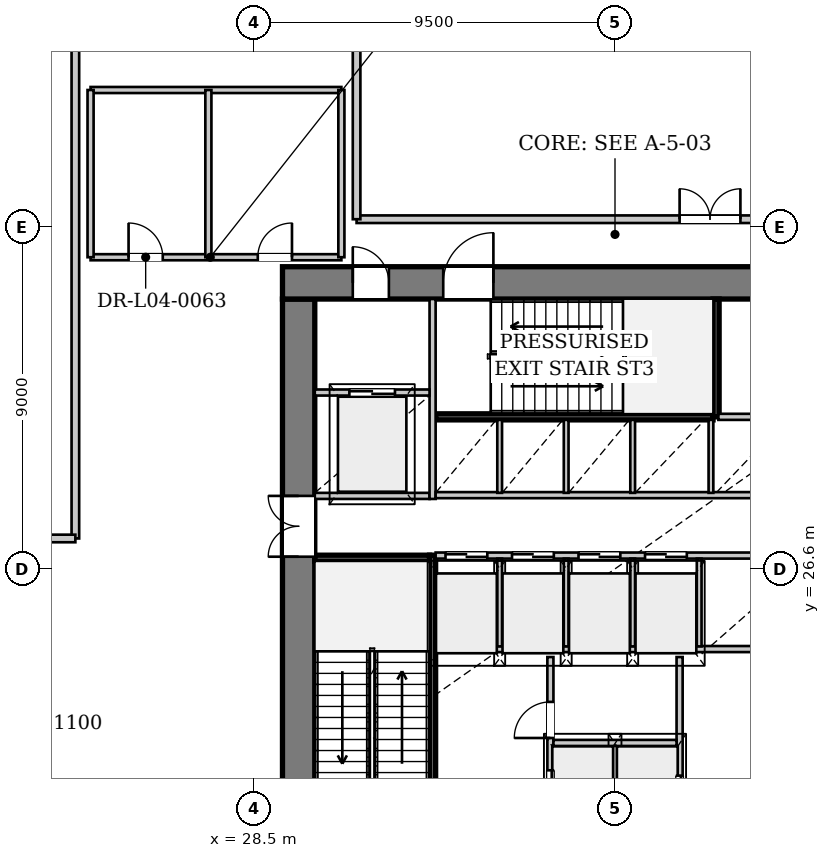
"""IFC4 building model, lengths in metres.
Left out: names, types, materials, properties, quantities, classifications, styles, units other than length and angle.
Written with IfcOpenShell. Run it as: python <this file> out.ifc"""

import sys

from ifc_helpers import new_model, si_unit, direction, frame, frame_2d, origin, place, context, subcontext, project, spatial, rectangle, extrude, source, transform, mapped, element, fill, save


model = new_model("IFC4")
c1 = context("Model", 3, precision=1e-05, world=origin(), true_north=direction((0.0, 1.0)))
c2 = subcontext(c1, "Body", "Model", "MODEL_VIEW")
j1 = project(units=[si_unit("LENGTHUNIT", "METRE"), si_unit("PLANEANGLEUNIT", "RADIAN")], contexts=[c1])
p1 = place(None, origin())
s1 = spatial("IfcSite", under=j1, at=p1, CompositionType="ELEMENT")
p2 = place(p1, origin())
s2 = spatial("IfcBuilding", under=s1, at=p2, CompositionType="ELEMENT")
p3 = place(p2, frame((0.0, 0.0, 20.1)))
s3 = spatial("IfcBuildingStorey", under=s2, at=p3, CompositionType="ELEMENT", Elevation=20.1)
p4 = place(p3, frame((29.675, 19.5, 0.0), z_axis=(0.0, 0.0, 1.0), x_axis=(0.0, 1.0, 0.0)))
e1 = element("IfcWall", 1, at=p4, inside=s3, PredefinedType="SHEAR", context=c2, shape_type="SweptSolid", body=[
    extrude(rectangle(XDim=14.2, YDim=0.85, at=frame_2d((7.1, 0.0))), origin(), (0.0, 0.0, 1.0), 4.08),
])
p5 = place(p4, frame((7.42, 0.0, 0.0)))
e2 = element("IfcOpeningElement", 2, at=p5, cuts=e1, PredefinedType="OPENING", context=c2, shape_type="SweptSolid", body=[
    extrude(rectangle(XDim=1.6, YDim=2.2, at=frame_2d((0.8, 1.1))), frame((0.0, 0.435, 0.0), z_axis=(0.0, -1.0, 0.0), x_axis=(1.0, 0.0, 0.0)), (0.0, 0.0, 1.0), 0.87),
])
p6 = place(p3, frame((29.25, 34.125, 0.0), z_axis=(0.0, 0.0, 1.0), x_axis=(1.0, 0.0, 0.0)))
e3 = element("IfcWall", 3, at=p6, inside=s3, PredefinedType="SHEAR", context=c2, shape_type="SweptSolid", body=[
    extrude(rectangle(XDim=17.5, YDim=0.85, at=frame_2d((8.75, 0.0))), origin(), (0.0, 0.0, 1.0), 4.08),
])
p7 = place(p6, frame((1.85, 0.0, 0.0)))
e4 = element("IfcOpeningElement", 4, at=p7, cuts=e3, PredefinedType="OPENING", context=c2, shape_type="SweptSolid", body=[
    extrude(rectangle(XDim=0.95, YDim=2.1, at=frame_2d((0.475, 1.05))), frame((0.0, 0.435, 0.0), z_axis=(0.0, -1.0, 0.0), x_axis=(1.0, 0.0, 0.0)), (0.0, 0.0, 1.0), 0.87),
])
p8 = place(p6, frame((4.23, 0.0, 0.0)))
e5 = element("IfcOpeningElement", 5, at=p8, cuts=e3, PredefinedType="OPENING", context=c2, shape_type="SweptSolid", body=[
    extrude(rectangle(XDim=1.32, YDim=2.2, at=frame_2d((0.66, 1.1))), frame((0.0, 0.435, 0.0), z_axis=(0.0, -1.0, 0.0), x_axis=(1.0, 0.0, 0.0)), (0.0, 0.0, 1.0), 0.87),
])
p9 = place(p6, frame((15.3, 0.0, 0.0)))
e6 = element("IfcOpeningElement", 6, at=p9, cuts=e3, PredefinedType="OPENING", context=c2, shape_type="SweptSolid", body=[
    extrude(rectangle(XDim=0.95, YDim=2.1, at=frame_2d((0.475, 1.05))), frame((0.0, 0.435, 0.0), z_axis=(0.0, -1.0, 0.0), x_axis=(1.0, 0.0, 0.0)), (0.0, 0.0, 1.0), 0.87),
])
p10 = place(p3, frame((33.2, 19.5, 0.0), z_axis=(0.0, 0.0, 1.0), x_axis=(0.0, 1.0, 0.0)))
e7 = element("IfcWall", 7, at=p10, inside=s3, PredefinedType="PARTITIONING", context=c2, shape_type="SweptSolid", body=[
    extrude(rectangle(XDim=7.46, YDim=0.16, at=frame_2d((3.73, 0.0))), origin(), (0.0, 0.0, 1.0), 4.08),
])
p11 = place(p10, frame((0.08, 0.0, 0.0)))
e8 = element("IfcOpeningElement", 8, at=p11, cuts=e7, PredefinedType="OPENING", context=c2, shape_type="SweptSolid", body=[
    extrude(rectangle(XDim=1.32, YDim=2.2, at=frame_2d((0.66, 1.1))), frame((0.0, 0.09, 0.0), z_axis=(0.0, -1.0, 0.0), x_axis=(1.0, 0.0, 0.0)), (0.0, 0.0, 1.0), 0.18),
])
p12 = place(p3, frame((30.1, 26.88, 0.0), z_axis=(0.0, 0.0, 1.0), x_axis=(1.0, 0.0, 0.0)))
e9 = element("IfcWall", 9, at=p12, inside=s3, PredefinedType="PARTITIONING", context=c2, shape_type="SweptSolid", body=[
    extrude(rectangle(XDim=3.02, YDim=0.16, at=frame_2d((1.51, 0.0))), origin(), (0.0, 0.0, 1.0), 4.08),
])
p13 = place(p3, frame((33.28, 30.6, 0.0), z_axis=(0.0, 0.0, 1.0), x_axis=(1.0, 0.0, 0.0)))
e10 = element("IfcWall", 10, at=p13, inside=s3, PredefinedType="PARTITIONING", context=c2, shape_type="SweptSolid", body=[
    extrude(rectangle(XDim=7.3, YDim=0.16, at=frame_2d((3.65, 0.0))), origin(), (0.0, 0.0, 1.0), 4.08),
])
p14 = place(p3, frame((40.66, 30.6, 0.0), z_axis=(0.0, 0.0, 1.0), x_axis=(0.0, 1.0, 0.0)))
e11 = element("IfcWall", 11, at=p14, inside=s3, PredefinedType="PARTITIONING", context=c2, shape_type="SweptSolid", body=[
    extrude(rectangle(XDim=3.1, YDim=0.16, at=frame_2d((1.55, 0.0))), origin(), (0.0, 0.0, 1.0), 4.08),
])
p15 = place(p3, frame((36.3, 19.5, 0.0), z_axis=(0.0, 0.0, 1.0), x_axis=(0.0, 1.0, 0.0)))
e12 = element("IfcWall", 12, at=p15, inside=s3, PredefinedType="PARTITIONING", context=c2, shape_type="SweptSolid", body=[
    extrude(rectangle(XDim=4.78, YDim=0.16, at=frame_2d((2.39, 0.0))), origin(), (0.0, 0.0, 1.0), 4.08),
])
p16 = place(p15, frame((0.6, 0.0, 0.0)))
e13 = element("IfcOpeningElement", 13, at=p16, cuts=e12, PredefinedType="OPENING", context=c2, shape_type="SweptSolid", body=[
    extrude(rectangle(XDim=1.2, YDim=2.2, at=frame_2d((0.6, 1.1))), frame((0.0, 0.09, 0.0), z_axis=(0.0, -1.0, 0.0), x_axis=(1.0, 0.0, 0.0)), (0.0, 0.0, 1.0), 0.18),
])
p17 = place(p15, frame((2.65, 0.0, 0.0)))
e14 = element("IfcOpeningElement", 14, at=p17, cuts=e12, PredefinedType="OPENING", context=c2, shape_type="SweptSolid", body=[
    extrude(rectangle(XDim=0.95, YDim=2.1, at=frame_2d((0.475, 1.05))), frame((0.0, 0.09, 0.0), z_axis=(0.0, -1.0, 0.0), x_axis=(1.0, 0.0, 0.0)), (0.0, 0.0, 1.0), 0.18),
])
p18 = place(p3, frame((39.7, 24.28, 0.0), z_axis=(0.0, 0.0, 1.0), x_axis=(0.0, -1.0, 0.0)))
e15 = element("IfcWall", 15, at=p18, inside=s3, PredefinedType="PARTITIONING", context=c2, shape_type="SweptSolid", body=[
    extrude(rectangle(XDim=4.78, YDim=0.16, at=frame_2d((2.39, 0.0))), origin(), (0.0, 0.0, 1.0), 4.08),
])
p19 = place(p18, frame((3.12, 0.0, 0.0)))
e16 = element("IfcOpeningElement", 16, at=p19, cuts=e15, PredefinedType="OPENING", context=c2, shape_type="SweptSolid", body=[
    extrude(rectangle(XDim=1.2, YDim=2.2, at=frame_2d((0.6, 1.1))), frame((0.0, 0.09, 0.0), z_axis=(0.0, -1.0, 0.0), x_axis=(1.0, 0.0, 0.0)), (0.0, 0.0, 1.0), 0.18),
])
p20 = place(p3, frame((38.0, 19.5, 0.0), z_axis=(0.0, 0.0, 1.0), x_axis=(0.0, 1.0, 0.0)))
e17 = element("IfcWall", 17, at=p20, inside=s3, PredefinedType="PARTITIONING", context=c2, shape_type="SweptSolid", body=[
    extrude(rectangle(XDim=2.46, YDim=0.125, at=frame_2d((1.23, 0.0))), origin(), (0.0, 0.0, 1.0), 4.08),
])
p21 = place(p3, frame((36.38, 22.02, 0.0), z_axis=(0.0, 0.0, 1.0), x_axis=(1.0, 0.0, 0.0)))
e18 = element("IfcWall", 18, at=p21, inside=s3, PredefinedType="PARTITIONING", context=c2, shape_type="SweptSolid", body=[
    extrude(rectangle(XDim=3.24, YDim=0.16, at=frame_2d((1.62, 0.0))), origin(), (0.0, 0.0, 1.0), 4.08),
])
p22 = place(p3, frame((33.28, 24.49, 0.0), z_axis=(0.0, 0.0, 1.0), x_axis=(1.0, 0.0, 0.0)))
e19 = element("IfcWall", 19, at=p22, inside=s3, PredefinedType="PARTITIONING", context=c2, shape_type="SweptSolid", body=[
    extrude(rectangle(XDim=9.44, YDim=0.16, at=frame_2d((4.72, 0.0))), origin(), (0.0, 0.0, 1.0), 4.08),
])
p23 = place(p3, frame((30.1, 28.52, 0.0), z_axis=(0.0, 0.0, 1.0), x_axis=(1.0, 0.0, 0.0)))
e20 = element("IfcWall", 20, at=p23, inside=s3, PredefinedType="PARTITIONING", context=c2, shape_type="SweptSolid", body=[
    extrude(rectangle(XDim=3.02, YDim=0.16, at=frame_2d((1.51, 0.0))), origin(), (0.0, 0.0, 1.0), 4.08),
])
p24 = place(p3, frame((33.2, 28.44, 0.0), z_axis=(0.0, 0.0, 1.0), x_axis=(0.0, 1.0, 0.0)))
e21 = element("IfcWall", 21, at=p24, inside=s3, PredefinedType="PARTITIONING", context=c2, shape_type="SweptSolid", body=[
    extrude(rectangle(XDim=5.26, YDim=0.16, at=frame_2d((2.63, 0.0))), origin(), (0.0, 0.0, 1.0), 4.08),
])
p25 = place(p3, frame((30.1, 31.24, 0.0), z_axis=(0.0, 0.0, 1.0), x_axis=(1.0, 0.0, 0.0)))
e22 = element("IfcWall", 22, at=p25, inside=s3, PredefinedType="PARTITIONING", context=c2, shape_type="SweptSolid", body=[
    extrude(rectangle(XDim=3.02, YDim=0.16, at=frame_2d((1.51, 0.0))), origin(), (0.0, 0.0, 1.0), 4.08),
])
p26 = place(p25, frame((0.91, 0.0, 0.0)))
e23 = element("IfcOpeningElement", 23, at=p26, cuts=e22, PredefinedType="OPENING", context=c2, shape_type="SweptSolid", body=[
    extrude(rectangle(XDim=1.2, YDim=2.2, at=frame_2d((0.6, 1.1))), frame((0.0, 0.09, 0.0), z_axis=(0.0, -1.0, 0.0), x_axis=(1.0, 0.0, 0.0)), (0.0, 0.0, 1.0), 0.18),
])
p27 = place(p3, frame((33.28, 26.95, 0.0), z_axis=(0.0, 0.0, 1.0), x_axis=(1.0, 0.0, 0.0)))
e24 = element("IfcWall", 24, at=p27, inside=s3, PredefinedType="PARTITIONING", context=c2, shape_type="SweptSolid", body=[
    extrude(rectangle(XDim=9.44, YDim=0.16, at=frame_2d((4.72, 0.0))), origin(), (0.0, 0.0, 1.0), 4.08),
])
p28 = place(p27, frame((0.26, 0.0, 0.0)))
e25 = element("IfcOpeningElement", 25, at=p28, cuts=e24, PredefinedType="OPENING", context=c2, shape_type="SweptSolid", body=[
    extrude(rectangle(XDim=1.1, YDim=2.2, at=frame_2d((0.55, 1.1))), frame((0.0, 0.09, 0.0), z_axis=(0.0, -1.0, 0.0), x_axis=(1.0, 0.0, 0.0)), (0.0, 0.0, 1.0), 0.18),
])
p29 = place(p27, frame((2.01, 0.0, 0.0)))
e26 = element("IfcOpeningElement", 26, at=p29, cuts=e24, PredefinedType="OPENING", context=c2, shape_type="SweptSolid", body=[
    extrude(rectangle(XDim=1.1, YDim=2.2, at=frame_2d((0.55, 1.1))), frame((0.0, 0.09, 0.0), z_axis=(0.0, -1.0, 0.0), x_axis=(1.0, 0.0, 0.0)), (0.0, 0.0, 1.0), 0.18),
])
p30 = place(p27, frame((3.76, 0.0, 0.0)))
e27 = element("IfcOpeningElement", 27, at=p30, cuts=e24, PredefinedType="OPENING", context=c2, shape_type="SweptSolid", body=[
    extrude(rectangle(XDim=1.1, YDim=2.2, at=frame_2d((0.55, 1.1))), frame((0.0, 0.09, 0.0), z_axis=(0.0, -1.0, 0.0), x_axis=(1.0, 0.0, 0.0)), (0.0, 0.0, 1.0), 0.18),
])
p31 = place(p27, frame((5.51, 0.0, 0.0)))
e28 = element("IfcOpeningElement", 28, at=p31, cuts=e24, PredefinedType="OPENING", context=c2, shape_type="SweptSolid", body=[
    extrude(rectangle(XDim=1.1, YDim=2.2, at=frame_2d((0.55, 1.1))), frame((0.0, 0.09, 0.0), z_axis=(0.0, -1.0, 0.0), x_axis=(1.0, 0.0, 0.0)), (0.0, 0.0, 1.0), 0.18),
])
for number, where, z_axis, x_axis in (
    (29, (34.965, 24.56, 0.0), (0.0, 0.0, 1.0), (0.0, 1.0, 0.0)),
    (30, (36.715, 24.56, 0.0), (0.0, 0.0, 1.0), (0.0, 1.0, 0.0)),
    (31, (38.465, 24.56, 0.0), (0.0, 0.0, 1.0), (0.0, 1.0, 0.0)),
    (32, (40.215, 24.56, 0.0), (0.0, 0.0, 1.0), (0.0, 1.0, 0.0)),
):
    element("IfcWall", number, at=place(p3, frame(where, z_axis=z_axis, x_axis=x_axis)), inside=s3, PredefinedType="PARTITIONING", context=c2, shape_type="SweptSolid", body=[
        extrude(rectangle(XDim=2.31, YDim=0.125, at=frame_2d((1.155, 0.0))), origin(), (0.0, 0.0, 1.0), 4.08),
    ])
p32 = place(p3, frame((33.28, 28.54, 0.0), z_axis=(0.0, 0.0, 1.0), x_axis=(1.0, 0.0, 0.0)))
e33 = element("IfcWall", 33, at=p32, inside=s3, PredefinedType="PARTITIONING", context=c2, shape_type="SweptSolid", body=[
    extrude(rectangle(XDim=12.62, YDim=0.16, at=frame_2d((6.31, 0.0))), origin(), (0.0, 0.0, 1.0), 4.08),
])
p33 = place(p3, frame((40.72, 30.6, 0.0), z_axis=(0.0, 0.0, 1.0), x_axis=(1.0, 0.0, 0.0)))
e34 = element("IfcWall", 34, at=p33, inside=s3, PredefinedType="PARTITIONING", context=c2, shape_type="SweptSolid", body=[
    extrude(rectangle(XDim=5.18, YDim=0.16, at=frame_2d((2.59, 0.0))), origin(), (0.0, 0.0, 1.0), 4.08),
])
for number, where, z_axis, x_axis in (
    (35, (34.965, 28.6, 0.0), (0.0, 0.0, 1.0), (0.0, 1.0, 0.0)),
    (36, (36.715, 28.6, 0.0), (0.0, 0.0, 1.0), (0.0, 1.0, 0.0)),
    (37, (38.465, 28.6, 0.0), (0.0, 0.0, 1.0), (0.0, 1.0, 0.0)),
    (38, (40.525, 28.6, 0.0), (0.0, 0.0, 1.0), (0.0, 1.0, 0.0)),
):
    element("IfcWall", number, at=place(p3, frame(where, z_axis=z_axis, x_axis=x_axis)), inside=s3, PredefinedType="PARTITIONING", context=c2, shape_type="SweptSolid", body=[
        extrude(rectangle(XDim=1.92, YDim=0.125, at=frame_2d((0.96, 0.0))), origin(), (0.0, 0.0, 1.0), 4.08),
    ])
p34 = place(p3, frame((23.8, 27.4, 0.0), z_axis=(0.0, 0.0, 1.0), x_axis=(0.0, 1.0, 0.0)))
e39 = element("IfcWall", 39, at=p34, inside=s3, PredefinedType="PARTITIONING", context=c2, shape_type="SweptSolid", body=[
    extrude(rectangle(XDim=21.14, YDim=0.2, at=frame_2d((10.57, 0.0))), origin(), (0.0, 0.0, 1.0), 3.43),
])
p35 = place(p34, frame((13.6, 0.0, 0.0)))
e40 = element("IfcOpeningElement", 40, at=p35, cuts=e39, PredefinedType="OPENING", context=c2, shape_type="SweptSolid", body=[
    extrude(rectangle(XDim=1.5, YDim=2.25, at=frame_2d((0.75, 1.125))), frame((0.0, 0.11, 0.0), z_axis=(0.0, -1.0, 0.0), x_axis=(1.0, 0.0, 0.0)), (0.0, 0.0, 1.0), 0.22),
])
p36 = place(p3, frame((6.58, 27.4, 0.0), z_axis=(0.0, 0.0, 1.0), x_axis=(1.0, 0.0, 0.0)))
e41 = element("IfcWall", 41, at=p36, inside=s3, PredefinedType="PARTITIONING", context=c2, shape_type="SweptSolid", body=[
    extrude(rectangle(XDim=17.22, YDim=0.2, at=frame_2d((8.61, 0.0))), origin(), (0.0, 0.0, 1.0), 3.43),
])
p37 = place(p3, frame((24.2, 34.8, 0.0), z_axis=(0.0, 0.0, 1.0), x_axis=(1.0, 0.0, 0.0)))
e42 = element("IfcWall", 42, at=p37, inside=s3, PredefinedType="PARTITIONING", context=c2, shape_type="SweptSolid", body=[
    extrude(rectangle(XDim=6.6, YDim=0.16, at=frame_2d((3.3, 0.0))), origin(), (0.0, 0.0, 1.0), 3.43),
])
p38 = place(p37, frame((1.0, 0.0, 0.0)))
e43 = element("IfcOpeningElement", 43, at=p38, cuts=e42, PredefinedType="OPENING", context=c2, shape_type="SweptSolid", body=[
    extrude(rectangle(XDim=0.9, YDim=2.1, at=frame_2d((0.45, 1.05))), frame((0.0, 0.09, 0.0), z_axis=(0.0, -1.0, 0.0), x_axis=(1.0, 0.0, 0.0)), (0.0, 0.0, 1.0), 0.18),
])
p39 = place(p37, frame((4.4, 0.0, 0.0)))
e44 = element("IfcOpeningElement", 44, at=p39, cuts=e42, PredefinedType="OPENING", context=c2, shape_type="SweptSolid", body=[
    extrude(rectangle(XDim=0.9, YDim=2.1, at=frame_2d((0.45, 1.05))), frame((0.0, 0.09, 0.0), z_axis=(0.0, -1.0, 0.0), x_axis=(1.0, 0.0, 0.0)), (0.0, 0.0, 1.0), 0.18),
])
p40 = place(p3, frame((24.2, 39.2, 0.0), z_axis=(0.0, 0.0, 1.0), x_axis=(1.0, 0.0, 0.0)))
e45 = element("IfcWall", 45, at=p40, inside=s3, PredefinedType="PARTITIONING", context=c2, shape_type="SweptSolid", body=[
    extrude(rectangle(XDim=6.6, YDim=0.16, at=frame_2d((3.3, 0.0))), origin(), (0.0, 0.0, 1.0), 3.43),
])
for number, where, z_axis, x_axis in (
    (46, (24.2, 34.8, 0.0), (0.0, 0.0, 1.0), (0.0, 1.0, 0.0)),
    (47, (27.3, 34.8, 0.0), (0.0, 0.0, 1.0), (0.0, 1.0, 0.0)),
    (48, (30.8, 34.8, 0.0), (0.0, 0.0, 1.0), (0.0, 1.0, 0.0)),
):
    element("IfcWall", number, at=place(p3, frame(where, z_axis=z_axis, x_axis=x_axis)), inside=s3, PredefinedType="PARTITIONING", context=c2, shape_type="SweptSolid", body=[
        extrude(rectangle(XDim=4.4, YDim=0.16, at=frame_2d((2.2, 0.0))), origin(), (0.0, 0.0, 1.0), 3.43),
    ])
p41 = place(p3, frame((31.2, 35.8, 0.0), z_axis=(0.0, 0.0, 1.0), x_axis=(1.0, 0.0, 0.0)))
e49 = element("IfcWall", 49, at=p41, inside=s3, PredefinedType="PARTITIONING", context=c2, shape_type="SweptSolid", body=[
    extrude(rectangle(XDim=20.88, YDim=0.2, at=frame_2d((10.44, 0.0))), origin(), (0.0, 0.0, 1.0), 3.43),
])
p42 = place(p41, frame((8.5, 0.0, 0.0)))
e50 = element("IfcOpeningElement", 50, at=p42, cuts=e49, PredefinedType="OPENING", context=c2, shape_type="SweptSolid", body=[
    extrude(rectangle(XDim=1.6, YDim=2.2, at=frame_2d((0.8, 1.1))), frame((0.0, 0.11, 0.0), z_axis=(0.0, -1.0, 0.0), x_axis=(1.0, 0.0, 0.0)), (0.0, 0.0, 1.0), 0.22),
])
p43 = place(p3, frame((31.2, 35.8, 0.0), z_axis=(0.0, 0.0, 1.0), x_axis=(0.0, 1.0, 0.0)))
e51 = element("IfcWall", 51, at=p43, inside=s3, PredefinedType="PARTITIONING", context=c2, shape_type="SweptSolid", body=[
    extrude(rectangle(XDim=12.74, YDim=0.2, at=frame_2d((6.37, 0.0))), origin(), (0.0, 0.0, 1.0), 3.43),
])
m1 = source(origin(), c2, "Body", "SweptSolid", [
    extrude(rectangle(XDim=1.6, YDim=2.2, at=frame_2d((0.8, 1.1))), frame((0.0, 0.025, 0.0), z_axis=(0.0, -1.0, 0.0), x_axis=(1.0, 0.0, 0.0)), (0.0, 0.0, 1.0), 0.05),
])
p44 = place(p5, origin())
e52 = element("IfcDoor", 52, at=p44, inside=s3, OperationType="DOUBLE_DOOR_SINGLE_SWING", PredefinedType="DOOR", context=c2, shape_type="MappedRepresentation", body=[
    mapped(m1, transform((0.0, 0.0, 0.0), x_axis=(1.0, 0.0, 0.0), y_axis=(0.0, 1.0, 0.0), z_axis=(0.0, 0.0, 1.0), scale=1.0)),
])
fill(e2, e52)
m2 = source(origin(), c2, "Body", "SweptSolid", [
    extrude(rectangle(XDim=0.95, YDim=2.1, at=frame_2d((0.475, 1.05))), frame((0.0, 0.025, 0.0), z_axis=(0.0, -1.0, 0.0), x_axis=(1.0, 0.0, 0.0)), (0.0, 0.0, 1.0), 0.05),
])
p45 = place(p7, origin())
e53 = element("IfcDoor", 53, at=p45, inside=s3, OperationType="SINGLE_SWING_LEFT", PredefinedType="DOOR", context=c2, shape_type="MappedRepresentation", body=[
    mapped(m2, transform((0.0, 0.0, 0.0), x_axis=(1.0, 0.0, 0.0), y_axis=(0.0, 1.0, 0.0), z_axis=(0.0, 0.0, 1.0), scale=1.0)),
])
fill(e4, e53)
m3 = source(origin(), c2, "Body", "SweptSolid", [
    extrude(rectangle(XDim=1.32, YDim=2.2, at=frame_2d((0.66, 1.1))), frame((0.0, 0.025, 0.0), z_axis=(0.0, -1.0, 0.0), x_axis=(1.0, 0.0, 0.0)), (0.0, 0.0, 1.0), 0.05),
])
p46 = place(p8, origin())
e54 = element("IfcDoor", 54, at=p46, inside=s3, OperationType="SINGLE_SWING_RIGHT", PredefinedType="DOOR", context=c2, shape_type="MappedRepresentation", body=[
    mapped(m3, transform((0.0, 0.0, 0.0), x_axis=(1.0, 0.0, 0.0), y_axis=(0.0, 1.0, 0.0), z_axis=(0.0, 0.0, 1.0), scale=1.0)),
])
fill(e5, e54)
m4 = source(origin(), c2, "Body", "SweptSolid", [
    extrude(rectangle(XDim=1.2, YDim=2.2, at=frame_2d((0.6, 1.1))), frame((0.0, 0.025, 0.0), z_axis=(0.0, -1.0, 0.0), x_axis=(1.0, 0.0, 0.0)), (0.0, 0.0, 1.0), 0.05),
])
p47 = place(p16, origin())
e55 = element("IfcDoor", 55, at=p47, inside=s3, OperationType="DOUBLE_DOOR_SLIDING", PredefinedType="DOOR", context=c2, shape_type="MappedRepresentation", body=[
    mapped(m4, transform((0.0, 0.0, 0.0), x_axis=(1.0, 0.0, 0.0), y_axis=(0.0, 1.0, 0.0), z_axis=(0.0, 0.0, 1.0), scale=1.0)),
])
fill(e13, e55)
p48 = place(p17, origin())
e56 = element("IfcDoor", 56, at=p48, inside=s3, OperationType="SINGLE_SWING_LEFT", PredefinedType="DOOR", context=c2, shape_type="MappedRepresentation", body=[
    mapped(m2, transform((0.0, 0.0, 0.0), x_axis=(1.0, 0.0, 0.0), y_axis=(0.0, 1.0, 0.0), z_axis=(0.0, 0.0, 1.0), scale=1.0)),
])
fill(e14, e56)
p49 = place(p19, origin())
e57 = element("IfcDoor", 57, at=p49, inside=s3, OperationType="DOUBLE_DOOR_SLIDING", PredefinedType="DOOR", context=c2, shape_type="MappedRepresentation", body=[
    mapped(m4, transform((0.0, 0.0, 0.0), x_axis=(1.0, 0.0, 0.0), y_axis=(0.0, 1.0, 0.0), z_axis=(0.0, 0.0, 1.0), scale=1.0)),
])
fill(e16, e57)
p50 = place(p26, origin())
e58 = element("IfcDoor", 58, at=p50, inside=s3, OperationType="DOUBLE_DOOR_SLIDING", PredefinedType="DOOR", context=c2, shape_type="MappedRepresentation", body=[
    mapped(m4, transform((0.0, 0.0, 0.0), x_axis=(1.0, 0.0, 0.0), y_axis=(0.0, 1.0, 0.0), z_axis=(0.0, 0.0, 1.0), scale=1.0)),
])
fill(e23, e58)
m5 = source(origin(), c2, "Body", "SweptSolid", [
    extrude(rectangle(XDim=1.1, YDim=2.2, at=frame_2d((0.55, 1.1))), frame((0.0, 0.025, 0.0), z_axis=(0.0, -1.0, 0.0), x_axis=(1.0, 0.0, 0.0)), (0.0, 0.0, 1.0), 0.05),
])
p51 = place(p28, origin())
e59 = element("IfcDoor", 59, at=p51, inside=s3, OperationType="DOUBLE_DOOR_SLIDING", PredefinedType="DOOR", context=c2, shape_type="MappedRepresentation", body=[
    mapped(m5, transform((0.0, 0.0, 0.0), x_axis=(1.0, 0.0, 0.0), y_axis=(0.0, 1.0, 0.0), z_axis=(0.0, 0.0, 1.0), scale=1.0)),
])
fill(e25, e59)
p52 = place(p29, origin())
e60 = element("IfcDoor", 60, at=p52, inside=s3, OperationType="DOUBLE_DOOR_SLIDING", PredefinedType="DOOR", context=c2, shape_type="MappedRepresentation", body=[
    mapped(m5, transform((0.0, 0.0, 0.0), x_axis=(1.0, 0.0, 0.0), y_axis=(0.0, 1.0, 0.0), z_axis=(0.0, 0.0, 1.0), scale=1.0)),
])
fill(e26, e60)
p53 = place(p30, origin())
e61 = element("IfcDoor", 61, at=p53, inside=s3, OperationType="DOUBLE_DOOR_SLIDING", PredefinedType="DOOR", context=c2, shape_type="MappedRepresentation", body=[
    mapped(m5, transform((0.0, 0.0, 0.0), x_axis=(1.0, 0.0, 0.0), y_axis=(0.0, 1.0, 0.0), z_axis=(0.0, 0.0, 1.0), scale=1.0)),
])
fill(e27, e61)
p54 = place(p31, origin())
e62 = element("IfcDoor", 62, at=p54, inside=s3, OperationType="DOUBLE_DOOR_SLIDING", PredefinedType="DOOR", context=c2, shape_type="MappedRepresentation", body=[
    mapped(m5, transform((0.0, 0.0, 0.0), x_axis=(1.0, 0.0, 0.0), y_axis=(0.0, 1.0, 0.0), z_axis=(0.0, 0.0, 1.0), scale=1.0)),
])
fill(e28, e62)
m6 = source(origin(), c2, "Body", "SweptSolid", [
    extrude(rectangle(XDim=0.9, YDim=2.1, at=frame_2d((0.45, 1.05))), frame((0.0, 0.025, 0.0), z_axis=(0.0, -1.0, 0.0), x_axis=(1.0, 0.0, 0.0)), (0.0, 0.0, 1.0), 0.05),
])
p55 = place(p38, origin())
e63 = element("IfcDoor", 63, at=p55, inside=s3, OperationType="SINGLE_SWING_LEFT", PredefinedType="DOOR", context=c2, shape_type="MappedRepresentation", body=[
    mapped(m6, transform((0.0, 0.0, 0.0), x_axis=(1.0, 0.0, 0.0), y_axis=(0.0, 1.0, 0.0), z_axis=(0.0, 0.0, 1.0), scale=1.0)),
])
fill(e43, e63)
p56 = place(p39, origin())
e64 = element("IfcDoor", 64, at=p56, inside=s3, OperationType="SINGLE_SWING_RIGHT", PredefinedType="DOOR", context=c2, shape_type="MappedRepresentation", body=[
    mapped(m6, transform((0.0, 0.0, 0.0), x_axis=(1.0, 0.0, 0.0), y_axis=(0.0, 1.0, 0.0), z_axis=(0.0, 0.0, 1.0), scale=1.0)),
])
fill(e44, e64)
p57 = place(p42, origin())
e65 = element("IfcDoor", 65, at=p57, inside=s3, OperationType="DOUBLE_DOOR_SINGLE_SWING", PredefinedType="DOOR", context=c2, shape_type="MappedRepresentation", body=[
    mapped(m1, transform((0.0, 0.0, 0.0), x_axis=(1.0, 0.0, 0.0), y_axis=(0.0, 1.0, 0.0), z_axis=(0.0, 0.0, 1.0), scale=1.0)),
])
fill(e50, e65)
save(model, sys.argv[1])
